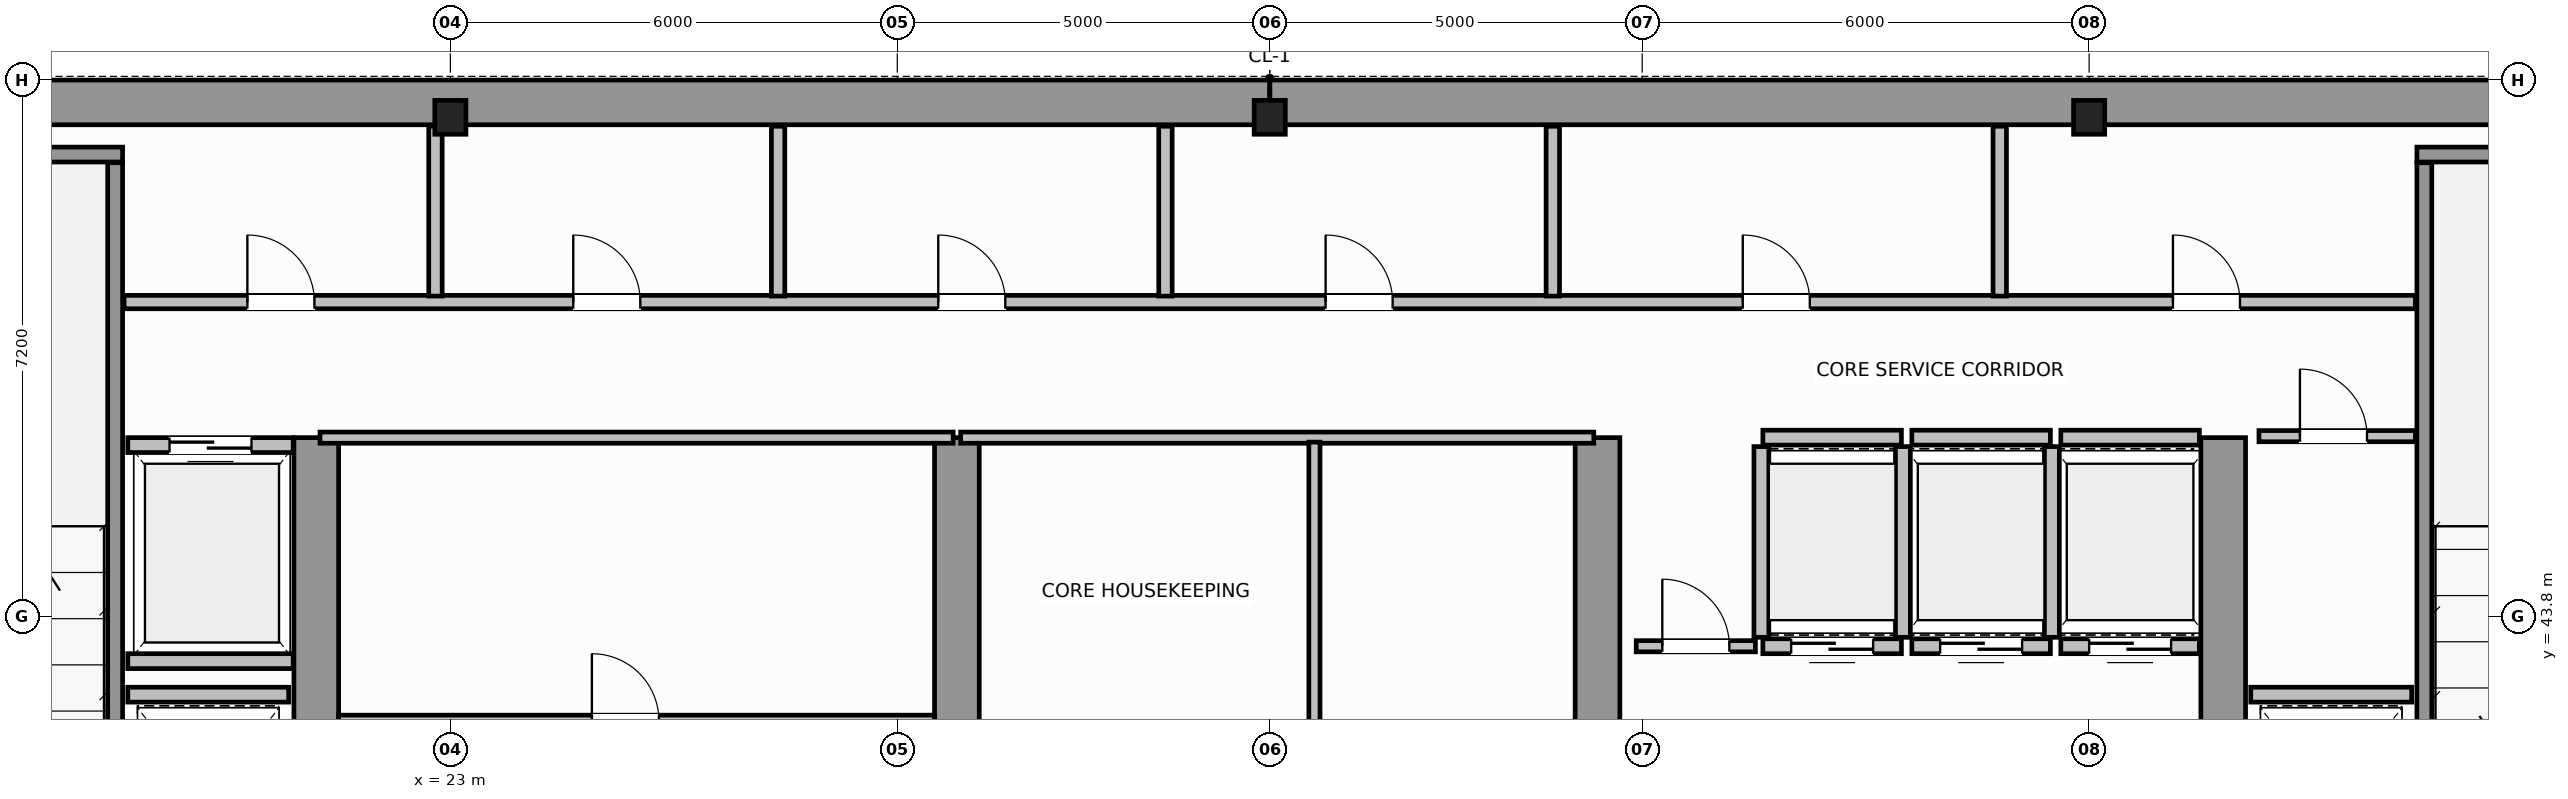
"""IFC4 building model, lengths in metres.
Left out: names, types, materials, properties, quantities, classifications, styles, units other than length and angle.
Written with IfcOpenShell. Run it as: python <this file> out.ifc"""

import sys

from ifc_helpers import new_model, si_unit, direction, frame, frame_2d, origin, origin_2d, place, context, subcontext, project, spatial, rectangle, i_section, extrude, source, transform, mapped, element, fill, save


model = new_model("IFC4")
c1 = context("Model", 3, precision=1e-05, world=origin(), true_north=direction((0.0, 1.0)))
c2 = subcontext(c1, "Body", "Model", "MODEL_VIEW")
j1 = project(units=[si_unit("LENGTHUNIT", "METRE"), si_unit("PLANEANGLEUNIT", "RADIAN")], contexts=[c1])
p1 = place(None, origin())
s1 = spatial("IfcSite", under=j1, at=p1, CompositionType="ELEMENT")
p2 = place(p1, origin())
s2 = spatial("IfcBuilding", under=s1, at=p2, CompositionType="ELEMENT")
p3 = place(p2, frame((0.0, 0.0, 234.6)))
s3 = spatial("IfcBuildingStorey", under=s2, at=p3, CompositionType="ELEMENT", Elevation=234.6)
m1 = source(origin(), c2, "Body", "SweptSolid", [
    extrude(i_section(OverallWidth=0.418, OverallDepth=0.455, WebThickness=0.042, FlangeThickness=0.058, FilletRadius=0.015, at=origin_2d()), origin(), (0.0, 0.0, 1.0), 3.8),
])
for number, where, z_axis, x_axis in (
    (1, (23.0, 50.5, 0.0), (0.0, 0.0, 1.0), (1.0, 0.0, 0.0)),
    (2, (34.0, 50.5, 0.0), (0.0, 0.0, 1.0), (1.0, 0.0, 0.0)),
    (3, (45.0, 50.5, 0.0), (0.0, 0.0, 1.0), (1.0, 0.0, 0.0)),
):
    element("IfcColumn", number, at=place(p3, frame(where, z_axis=z_axis, x_axis=x_axis)), inside=s3, PredefinedType="COLUMN", context=c2, shape_type="MappedRepresentation", body=[
        mapped(m1, transform((0.0, 0.0, 0.0), scale=1.0)),
    ])
for number, where, z_axis, x_axis in (
    (4, (14.304, 50.7, 0.0), (0.0, 0.0, 1.0), (1.0, 0.0, 0.0)),
    (5, (34.002, 50.7, 0.0), (0.0, 0.0, 1.0), (1.0, 0.0, 0.0)),
):
    element("IfcWall", number, at=place(p3, frame(where, z_axis=z_axis, x_axis=x_axis)), inside=s3, PredefinedType="SHEAR", context=c2, shape_type="SweptSolid", body=[
        extrude(rectangle(XDim=19.694, YDim=0.6, at=frame_2d((9.847, 0.0))), origin(), (0.0, 0.0, 1.0), 3.8),
    ])
for number, where, z_axis, x_axis in (
    (6, (21.2, 36.82, 0.0), (0.0, 0.0, 1.0), (0.0, 1.0, 0.0)),
    (7, (29.8, 36.82, 0.0), (0.0, 0.0, 1.0), (0.0, 1.0, 0.0)),
    (8, (38.4, 36.82, 0.0), (0.0, 0.0, 1.0), (0.0, 1.0, 0.0)),
    (9, (46.8, 36.82, 0.0), (0.0, 0.0, 1.0), (0.0, 1.0, 0.0)),
):
    element("IfcWall", number, at=place(p3, frame(where, z_axis=z_axis, x_axis=x_axis)), inside=s3, PredefinedType="SHEAR", context=c2, shape_type="SweptSolid", body=[
        extrude(rectangle(XDim=9.38, YDim=0.6, at=frame_2d((4.69, 0.0))), origin(), (0.0, 0.0, 1.0), 3.8),
    ])
p4 = place(p3, frame((14.3, 50.0, 0.0), z_axis=(0.0, 0.0, 1.0), x_axis=(1.0, 0.0, 0.0)))
e10 = element("IfcWall", 10, at=p4, inside=s3, PredefinedType="SOLIDWALL", context=c2, shape_type="SweptSolid", body=[
    extrude(rectangle(XDim=4.3, YDim=0.2, at=frame_2d((2.15, 0.0))), origin(), (0.0, 0.0, 1.0), 3.8),
])
p5 = place(p3, frame((18.5, 39.96, 0.0), z_axis=(0.0, 0.0, 1.0), x_axis=(0.0, 1.0, 0.0)))
e11 = element("IfcWall", 11, at=p5, inside=s3, PredefinedType="SOLIDWALL", context=c2, shape_type="SweptSolid", body=[
    extrude(rectangle(XDim=9.93, YDim=0.2, at=frame_2d((4.965, 0.0))), origin(), (0.0, 0.0, 1.0), 3.8),
])
p6 = place(p3, frame((49.4, 50.0, 0.0), z_axis=(0.0, 0.0, 1.0), x_axis=(1.0, 0.0, 0.0)))
e12 = element("IfcWall", 12, at=p6, inside=s3, PredefinedType="SOLIDWALL", context=c2, shape_type="SweptSolid", body=[
    extrude(rectangle(XDim=4.3, YDim=0.2, at=frame_2d((2.15, 0.0))), origin(), (0.0, 0.0, 1.0), 3.8),
])
p7 = place(p3, frame((49.5, 39.96, 0.0), z_axis=(0.0, 0.0, 1.0), x_axis=(0.0, 1.0, 0.0)))
e13 = element("IfcWall", 13, at=p7, inside=s3, PredefinedType="SOLIDWALL", context=c2, shape_type="SweptSolid", body=[
    extrude(rectangle(XDim=9.93, YDim=0.2, at=frame_2d((4.965, 0.0))), origin(), (0.0, 0.0, 1.0), 3.8),
])
p8 = place(p3, frame((40.62, 43.4, 0.0), z_axis=(0.0, 0.0, 1.0), x_axis=(1.0, 0.0, 0.0)))
e14 = element("IfcWall", 14, at=p8, inside=s3, PredefinedType="SOLIDWALL", context=c2, shape_type="SweptSolid", body=[
    extrude(rectangle(XDim=1.86, YDim=0.2, at=frame_2d((0.93, 0.0))), origin(), (0.0, 0.0, 1.0), 3.58),
])
p9 = place(p8, frame((0.38, 0.0, 0.0)))
e15 = element("IfcOpeningElement", 15, at=p9, cuts=e14, PredefinedType="OPENING", context=c2, shape_type="SweptSolid", body=[
    extrude(rectangle(XDim=1.1, YDim=2.15, at=frame_2d((0.55, 1.075))), frame((0.0, 0.11, 0.0), z_axis=(0.0, -1.0, 0.0), x_axis=(1.0, 0.0, 0.0)), (0.0, 0.0, 1.0), 0.22),
])
p10 = place(p3, frame((40.62, 46.2, 0.0), z_axis=(0.0, 0.0, 1.0), x_axis=(1.0, 0.0, 0.0)))
e16 = element("IfcWall", 16, at=p10, inside=s3, PredefinedType="SOLIDWALL", context=c2, shape_type="SweptSolid", body=[
    extrude(rectangle(XDim=1.86, YDim=0.2, at=frame_2d((0.93, 0.0))), origin(), (0.0, 0.0, 1.0), 3.58),
])
for number, where, z_axis, x_axis in (
    (17, (40.6, 43.52, 0.0), (0.0, 0.0, 1.0), (0.0, 1.0, 0.0)),
    (18, (42.5, 43.52, 0.0), (0.0, 0.0, 1.0), (0.0, 1.0, 0.0)),
):
    element("IfcWall", number, at=place(p3, frame(where, z_axis=z_axis, x_axis=x_axis)), inside=s3, PredefinedType="SOLIDWALL", context=c2, shape_type="SweptSolid", body=[
        extrude(rectangle(XDim=2.56, YDim=0.2, at=frame_2d((1.28, 0.0))), origin(), (0.0, 0.0, 1.0), 3.58),
    ])
p11 = place(p3, frame((42.62, 43.4, 0.0), z_axis=(0.0, 0.0, 1.0), x_axis=(1.0, 0.0, 0.0)))
e19 = element("IfcWall", 19, at=p11, inside=s3, PredefinedType="SOLIDWALL", context=c2, shape_type="SweptSolid", body=[
    extrude(rectangle(XDim=1.86, YDim=0.2, at=frame_2d((0.93, 0.0))), origin(), (0.0, 0.0, 1.0), 3.58),
])
p12 = place(p11, frame((0.38, 0.0, 0.0)))
e20 = element("IfcOpeningElement", 20, at=p12, cuts=e19, PredefinedType="OPENING", context=c2, shape_type="SweptSolid", body=[
    extrude(rectangle(XDim=1.1, YDim=2.15, at=frame_2d((0.55, 1.075))), frame((0.0, 0.11, 0.0), z_axis=(0.0, -1.0, 0.0), x_axis=(1.0, 0.0, 0.0)), (0.0, 0.0, 1.0), 0.22),
])
p13 = place(p3, frame((42.62, 46.2, 0.0), z_axis=(0.0, 0.0, 1.0), x_axis=(1.0, 0.0, 0.0)))
e21 = element("IfcWall", 21, at=p13, inside=s3, PredefinedType="SOLIDWALL", context=c2, shape_type="SweptSolid", body=[
    extrude(rectangle(XDim=1.86, YDim=0.2, at=frame_2d((0.93, 0.0))), origin(), (0.0, 0.0, 1.0), 3.58),
])
p14 = place(p3, frame((44.5, 43.52, 0.0), z_axis=(0.0, 0.0, 1.0), x_axis=(0.0, 1.0, 0.0)))
e22 = element("IfcWall", 22, at=p14, inside=s3, PredefinedType="SOLIDWALL", context=c2, shape_type="SweptSolid", body=[
    extrude(rectangle(XDim=2.56, YDim=0.2, at=frame_2d((1.28, 0.0))), origin(), (0.0, 0.0, 1.0), 2.37),
])
p15 = place(p3, frame((44.62, 43.4, 0.0), z_axis=(0.0, 0.0, 1.0), x_axis=(1.0, 0.0, 0.0)))
e23 = element("IfcWall", 23, at=p15, inside=s3, PredefinedType="SOLIDWALL", context=c2, shape_type="SweptSolid", body=[
    extrude(rectangle(XDim=1.86, YDim=0.2, at=frame_2d((0.93, 0.0))), origin(), (0.0, 0.0, 1.0), 3.58),
])
p16 = place(p15, frame((0.38, 0.0, 0.0)))
e24 = element("IfcOpeningElement", 24, at=p16, cuts=e23, PredefinedType="OPENING", context=c2, shape_type="SweptSolid", body=[
    extrude(rectangle(XDim=1.1, YDim=2.15, at=frame_2d((0.55, 1.075))), frame((0.0, 0.11, 0.0), z_axis=(0.0, -1.0, 0.0), x_axis=(1.0, 0.0, 0.0)), (0.0, 0.0, 1.0), 0.22),
])
p17 = place(p3, frame((44.62, 46.2, 0.0), z_axis=(0.0, 0.0, 1.0), x_axis=(1.0, 0.0, 0.0)))
e25 = element("IfcWall", 25, at=p17, inside=s3, PredefinedType="SOLIDWALL", context=c2, shape_type="SweptSolid", body=[
    extrude(rectangle(XDim=1.86, YDim=0.2, at=frame_2d((0.93, 0.0))), origin(), (0.0, 0.0, 1.0), 3.58),
])
p18 = place(p3, frame((18.67, 46.1, 0.0), z_axis=(0.0, 0.0, 1.0), x_axis=(1.0, 0.0, 0.0)))
e26 = element("IfcWall", 26, at=p18, inside=s3, PredefinedType="SOLIDWALL", context=c2, shape_type="SweptSolid", body=[
    extrude(rectangle(XDim=2.22, YDim=0.2, at=frame_2d((1.11, 0.0))), origin(), (0.0, 0.0, 1.0), 3.58),
])
p19 = place(p18, frame((0.56, 0.0, 0.0)))
e27 = element("IfcOpeningElement", 27, at=p19, cuts=e26, PredefinedType="OPENING", context=c2, shape_type="SweptSolid", body=[
    extrude(rectangle(XDim=1.1, YDim=2.15, at=frame_2d((0.55, 1.075))), frame((0.0, 0.11, 0.0), z_axis=(0.0, -1.0, 0.0), x_axis=(1.0, 0.0, 0.0)), (0.0, 0.0, 1.0), 0.22),
])
p20 = place(p3, frame((18.67, 43.2, 0.0), z_axis=(0.0, 0.0, 1.0), x_axis=(1.0, 0.0, 0.0)))
e28 = element("IfcWall", 28, at=p20, inside=s3, PredefinedType="SOLIDWALL", context=c2, shape_type="SweptSolid", body=[
    extrude(rectangle(XDim=2.22, YDim=0.2, at=frame_2d((1.11, 0.0))), origin(), (0.0, 0.0, 1.0), 3.58),
])
for number, where, z_axis, x_axis in (
    (29, (18.67, 42.75, 0.0), (0.0, 0.0, 1.0), (1.0, 0.0, 0.0)),
    (30, (47.17, 42.75, 0.0), (0.0, 0.0, 1.0), (1.0, 0.0, 0.0)),
):
    element("IfcWall", number, at=place(p3, frame(where, z_axis=z_axis, x_axis=x_axis)), inside=s3, PredefinedType="SOLIDWALL", context=c2, shape_type="SweptSolid", body=[
        extrude(rectangle(XDim=2.16, YDim=0.2, at=frame_2d((1.08, 0.0))), origin(), (0.0, 0.0, 1.0), 3.58),
    ])
p21 = place(p3, frame((21.25, 46.2, 0.0), z_axis=(0.0, 0.0, 1.0), x_axis=(1.0, 0.0, 0.0)))
e31 = element("IfcWall", 31, at=p21, inside=s3, PredefinedType="PARTITIONING", context=c2, shape_type="SweptSolid", body=[
    extrude(rectangle(XDim=8.5, YDim=0.15, at=frame_2d((4.25, 0.0))), origin(), (0.0, 0.0, 1.0), 3.58),
])
p22 = place(p3, frame((21.5, 42.4, 0.0), z_axis=(0.0, 0.0, 1.0), x_axis=(1.0, 0.0, 0.0)))
e32 = element("IfcWall", 32, at=p22, inside=s3, PredefinedType="PARTITIONING", context=c2, shape_type="SweptSolid", body=[
    extrude(rectangle(XDim=8.0, YDim=0.15, at=frame_2d((4.0, 0.0))), origin(), (0.0, 0.0, 1.0), 3.58),
])
p23 = place(p22, frame((3.4, 0.0, 0.0)))
e33 = element("IfcOpeningElement", 33, at=p23, cuts=e32, PredefinedType="OPENING", context=c2, shape_type="SweptSolid", body=[
    extrude(rectangle(XDim=0.9, YDim=2.1, at=frame_2d((0.45, 1.05))), frame((0.0, 0.085, 0.0), z_axis=(0.0, -1.0, 0.0), x_axis=(1.0, 0.0, 0.0)), (0.0, 0.0, 1.0), 0.17),
])
p24 = place(p3, frame((29.85, 46.2, 0.0), z_axis=(0.0, 0.0, 1.0), x_axis=(1.0, 0.0, 0.0)))
e34 = element("IfcWall", 34, at=p24, inside=s3, PredefinedType="PARTITIONING", context=c2, shape_type="SweptSolid", body=[
    extrude(rectangle(XDim=8.5, YDim=0.15, at=frame_2d((4.25, 0.0))), origin(), (0.0, 0.0, 1.0), 3.58),
])
p25 = place(p3, frame((34.6, 36.56, 0.0), z_axis=(0.0, 0.0, 1.0), x_axis=(0.0, 1.0, 0.0)))
e35 = element("IfcWall", 35, at=p25, inside=s3, PredefinedType="PARTITIONING", context=c2, shape_type="SweptSolid", body=[
    extrude(rectangle(XDim=9.58, YDim=0.15, at=frame_2d((4.79, 0.0))), origin(), (0.0, 0.0, 1.0), 3.58),
])
p26 = place(p25, frame((4.2, 0.0, 0.0)))
e36 = element("IfcOpeningElement", 36, at=p26, cuts=e35, PredefinedType="OPENING", context=c2, shape_type="SweptSolid", body=[
    extrude(rectangle(XDim=0.9, YDim=2.1, at=frame_2d((0.45, 1.05))), frame((0.0, 0.085, 0.0), z_axis=(0.0, -1.0, 0.0), x_axis=(1.0, 0.0, 0.0)), (0.0, 0.0, 1.0), 0.17),
])
p27 = place(p3, frame((47.28, 46.22, 0.0), z_axis=(0.0, 0.0, 1.0), x_axis=(1.0, 0.0, 0.0)))
e37 = element("IfcWall", 37, at=p27, inside=s3, PredefinedType="PARTITIONING", context=c2, shape_type="SweptSolid", body=[
    extrude(rectangle(XDim=2.1, YDim=0.15, at=frame_2d((1.05, 0.0))), origin(), (0.0, 0.0, 1.0), 3.58),
])
p28 = place(p27, frame((0.55, 0.0, 0.0)))
e38 = element("IfcOpeningElement", 38, at=p28, cuts=e37, PredefinedType="OPENING", context=c2, shape_type="SweptSolid", body=[
    extrude(rectangle(XDim=0.9, YDim=2.1, at=frame_2d((0.45, 1.05))), frame((0.0, 0.085, 0.0), z_axis=(0.0, -1.0, 0.0), x_axis=(1.0, 0.0, 0.0)), (0.0, 0.0, 1.0), 0.17),
])
p29 = place(p3, frame((38.92, 43.4, 0.0), z_axis=(0.0, 0.0, 1.0), x_axis=(1.0, 0.0, 0.0)))
e39 = element("IfcWall", 39, at=p29, inside=s3, PredefinedType="PARTITIONING", context=c2, shape_type="SweptSolid", body=[
    extrude(rectangle(XDim=1.6, YDim=0.15, at=frame_2d((0.8, 0.0))), origin(), (0.0, 0.0, 1.0), 3.58),
])
p30 = place(p29, frame((0.35, 0.0, 0.0)))
e40 = element("IfcOpeningElement", 40, at=p30, cuts=e39, PredefinedType="OPENING", context=c2, shape_type="SweptSolid", body=[
    extrude(rectangle(XDim=0.9, YDim=2.1, at=frame_2d((0.45, 1.05))), frame((0.0, 0.085, 0.0), z_axis=(0.0, -1.0, 0.0), x_axis=(1.0, 0.0, 0.0)), (0.0, 0.0, 1.0), 0.17),
])
p31 = place(p3, frame((18.62, 48.02, 0.0), z_axis=(0.0, 0.0, 1.0), x_axis=(1.0, 0.0, 0.0)))
e41 = element("IfcWall", 41, at=p31, inside=s3, PredefinedType="PLUMBINGWALL", context=c2, shape_type="SweptSolid", body=[
    extrude(rectangle(XDim=30.76, YDim=0.18, at=frame_2d((15.38, 0.0))), origin(), (0.0, 0.0, 1.0), 3.58),
])
p32 = place(p31, frame((1.655, 0.0, 0.0)))
e42 = element("IfcOpeningElement", 42, at=p32, cuts=e41, PredefinedType="OPENING", context=c2, shape_type="SweptSolid", body=[
    extrude(rectangle(XDim=0.9, YDim=2.15, at=frame_2d((0.45, 1.075))), frame((0.0, 0.1, 0.0), z_axis=(0.0, -1.0, 0.0), x_axis=(1.0, 0.0, 0.0)), (0.0, 0.0, 1.0), 0.2),
])
p33 = place(p31, frame((6.03, 0.0, 0.0)))
e43 = element("IfcOpeningElement", 43, at=p33, cuts=e41, PredefinedType="OPENING", context=c2, shape_type="SweptSolid", body=[
    extrude(rectangle(XDim=0.9, YDim=2.15, at=frame_2d((0.45, 1.075))), frame((0.0, 0.1, 0.0), z_axis=(0.0, -1.0, 0.0), x_axis=(1.0, 0.0, 0.0)), (0.0, 0.0, 1.0), 0.2),
])
p34 = place(p31, frame((10.93, 0.0, 0.0)))
e44 = element("IfcOpeningElement", 44, at=p34, cuts=e41, PredefinedType="OPENING", context=c2, shape_type="SweptSolid", body=[
    extrude(rectangle(XDim=0.9, YDim=2.15, at=frame_2d((0.45, 1.075))), frame((0.0, 0.1, 0.0), z_axis=(0.0, -1.0, 0.0), x_axis=(1.0, 0.0, 0.0)), (0.0, 0.0, 1.0), 0.2),
])
p35 = place(p31, frame((16.13, 0.0, 0.0)))
e45 = element("IfcOpeningElement", 45, at=p35, cuts=e41, PredefinedType="OPENING", context=c2, shape_type="SweptSolid", body=[
    extrude(rectangle(XDim=0.9, YDim=2.15, at=frame_2d((0.45, 1.075))), frame((0.0, 0.1, 0.0), z_axis=(0.0, -1.0, 0.0), x_axis=(1.0, 0.0, 0.0)), (0.0, 0.0, 1.0), 0.2),
])
p36 = place(p31, frame((21.73, 0.0, 0.0)))
e46 = element("IfcOpeningElement", 46, at=p36, cuts=e41, PredefinedType="OPENING", context=c2, shape_type="SweptSolid", body=[
    extrude(rectangle(XDim=0.9, YDim=2.15, at=frame_2d((0.45, 1.075))), frame((0.0, 0.1, 0.0), z_axis=(0.0, -1.0, 0.0), x_axis=(1.0, 0.0, 0.0)), (0.0, 0.0, 1.0), 0.2),
])
p37 = place(p31, frame((27.505, 0.0, 0.0)))
e47 = element("IfcOpeningElement", 47, at=p37, cuts=e41, PredefinedType="OPENING", context=c2, shape_type="SweptSolid", body=[
    extrude(rectangle(XDim=0.9, YDim=2.15, at=frame_2d((0.45, 1.075))), frame((0.0, 0.1, 0.0), z_axis=(0.0, -1.0, 0.0), x_axis=(1.0, 0.0, 0.0)), (0.0, 0.0, 1.0), 0.2),
])
p38 = place(p3, frame((22.8, 48.1, 0.0), z_axis=(0.0, 0.0, 1.0), x_axis=(0.0, 1.0, 0.0)))
e48 = element("IfcWall", 48, at=p38, inside=s3, PredefinedType="PLUMBINGWALL", context=c2, shape_type="SweptSolid", body=[
    extrude(rectangle(XDim=2.28, YDim=0.18, at=frame_2d((1.14, 0.0))), origin(), (0.0, 0.0, 1.0), 2.37),
])
for number, where, z_axis, x_axis in (
    (49, (27.4, 48.1, 0.0), (0.0, 0.0, 1.0), (0.0, 1.0, 0.0)),
    (50, (32.6, 48.1, 0.0), (0.0, 0.0, 1.0), (0.0, 1.0, 0.0)),
    (51, (37.8, 48.1, 0.0), (0.0, 0.0, 1.0), (0.0, 1.0, 0.0)),
    (52, (43.8, 48.1, 0.0), (0.0, 0.0, 1.0), (0.0, 1.0, 0.0)),
):
    element("IfcWall", number, at=place(p3, frame(where, z_axis=z_axis, x_axis=x_axis)), inside=s3, PredefinedType="PLUMBINGWALL", context=c2, shape_type="SweptSolid", body=[
        extrude(rectangle(XDim=2.28, YDim=0.18, at=frame_2d((1.14, 0.0))), origin(), (0.0, 0.0, 1.0), 3.58),
    ])
m2 = source(origin(), c2, "Body", "SweptSolid", [
    extrude(rectangle(XDim=1.1, YDim=2.15, at=frame_2d((0.55, 1.075))), frame((0.0, 0.025, 0.0), z_axis=(0.0, -1.0, 0.0), x_axis=(1.0, 0.0, 0.0)), (0.0, 0.0, 1.0), 0.05),
])
p39 = place(p9, origin())
e53 = element("IfcDoor", 53, at=p39, inside=s3, OperationType="DOUBLE_DOOR_SLIDING", PredefinedType="DOOR", context=c2, shape_type="MappedRepresentation", body=[
    mapped(m2, transform((0.0, 0.0, 0.0), scale=1.0)),
])
fill(e15, e53)
p40 = place(p12, origin())
e54 = element("IfcDoor", 54, at=p40, inside=s3, OperationType="DOUBLE_DOOR_SLIDING", PredefinedType="DOOR", context=c2, shape_type="MappedRepresentation", body=[
    mapped(m2, transform((0.0, 0.0, 0.0), scale=1.0)),
])
fill(e20, e54)
p41 = place(p16, origin())
e55 = element("IfcDoor", 55, at=p41, inside=s3, OperationType="DOUBLE_DOOR_SLIDING", PredefinedType="DOOR", context=c2, shape_type="MappedRepresentation", body=[
    mapped(m2, transform((0.0, 0.0, 0.0), scale=1.0)),
])
fill(e24, e55)
p42 = place(p19, origin())
e56 = element("IfcDoor", 56, at=p42, inside=s3, OperationType="DOUBLE_DOOR_SLIDING", PredefinedType="DOOR", context=c2, shape_type="MappedRepresentation", body=[
    mapped(m2, transform((0.0, 0.0, 0.0), scale=1.0)),
])
fill(e27, e56)
m3 = source(origin(), c2, "Body", "SweptSolid", [
    extrude(rectangle(XDim=0.9, YDim=2.1, at=frame_2d((0.45, 1.05))), frame((0.0, 0.025, 0.0), z_axis=(0.0, -1.0, 0.0), x_axis=(1.0, 0.0, 0.0)), (0.0, 0.0, 1.0), 0.05),
])
p43 = place(p23, origin())
e57 = element("IfcDoor", 57, at=p43, inside=s3, OperationType="SINGLE_SWING_RIGHT", PredefinedType="DOOR", context=c2, shape_type="MappedRepresentation", body=[
    mapped(m3, transform((0.0, 0.0, 0.0), scale=1.0)),
])
fill(e33, e57)
p44 = place(p28, origin())
e58 = element("IfcDoor", 58, at=p44, inside=s3, OperationType="SINGLE_SWING_RIGHT", PredefinedType="DOOR", context=c2, shape_type="MappedRepresentation", body=[
    mapped(m3, transform((0.0, 0.0, 0.0), scale=1.0)),
])
fill(e38, e58)
p45 = place(p30, origin())
e59 = element("IfcDoor", 59, at=p45, inside=s3, OperationType="SINGLE_SWING_LEFT", PredefinedType="DOOR", context=c2, shape_type="MappedRepresentation", body=[
    mapped(m3, transform((0.0, 0.0, 0.0), scale=1.0)),
])
fill(e40, e59)
m4 = source(origin(), c2, "Body", "SweptSolid", [
    extrude(rectangle(XDim=0.9, YDim=2.15, at=frame_2d((0.45, 1.075))), frame((0.0, 0.025, 0.0), z_axis=(0.0, -1.0, 0.0), x_axis=(1.0, 0.0, 0.0)), (0.0, 0.0, 1.0), 0.05),
])
p46 = place(p32, origin())
e60 = element("IfcDoor", 60, at=p46, inside=s3, OperationType="SINGLE_SWING_LEFT", PredefinedType="DOOR", context=c2, shape_type="MappedRepresentation", body=[
    mapped(m4, transform((0.0, 0.0, 0.0), scale=1.0)),
])
fill(e42, e60)
p47 = place(p33, origin())
e61 = element("IfcDoor", 61, at=p47, inside=s3, OperationType="SINGLE_SWING_RIGHT", PredefinedType="DOOR", context=c2, shape_type="MappedRepresentation", body=[
    mapped(m4, transform((0.0, 0.0, 0.0), scale=1.0)),
])
fill(e43, e61)
p48 = place(p34, origin())
e62 = element("IfcDoor", 62, at=p48, inside=s3, OperationType="SINGLE_SWING_LEFT", PredefinedType="DOOR", context=c2, shape_type="MappedRepresentation", body=[
    mapped(m4, transform((0.0, 0.0, 0.0), scale=1.0)),
])
fill(e44, e62)
p49 = place(p35, origin())
e63 = element("IfcDoor", 63, at=p49, inside=s3, OperationType="SINGLE_SWING_RIGHT", PredefinedType="DOOR", context=c2, shape_type="MappedRepresentation", body=[
    mapped(m4, transform((0.0, 0.0, 0.0), scale=1.0)),
])
fill(e45, e63)
p50 = place(p36, origin())
e64 = element("IfcDoor", 64, at=p50, inside=s3, OperationType="SINGLE_SWING_LEFT", PredefinedType="DOOR", context=c2, shape_type="MappedRepresentation", body=[
    mapped(m4, transform((0.0, 0.0, 0.0), scale=1.0)),
])
fill(e46, e64)
p51 = place(p37, origin())
e65 = element("IfcDoor", 65, at=p51, inside=s3, OperationType="SINGLE_SWING_RIGHT", PredefinedType="DOOR", context=c2, shape_type="MappedRepresentation", body=[
    mapped(m4, transform((0.0, 0.0, 0.0), scale=1.0)),
])
fill(e47, e65)
save(model, sys.argv[1])
